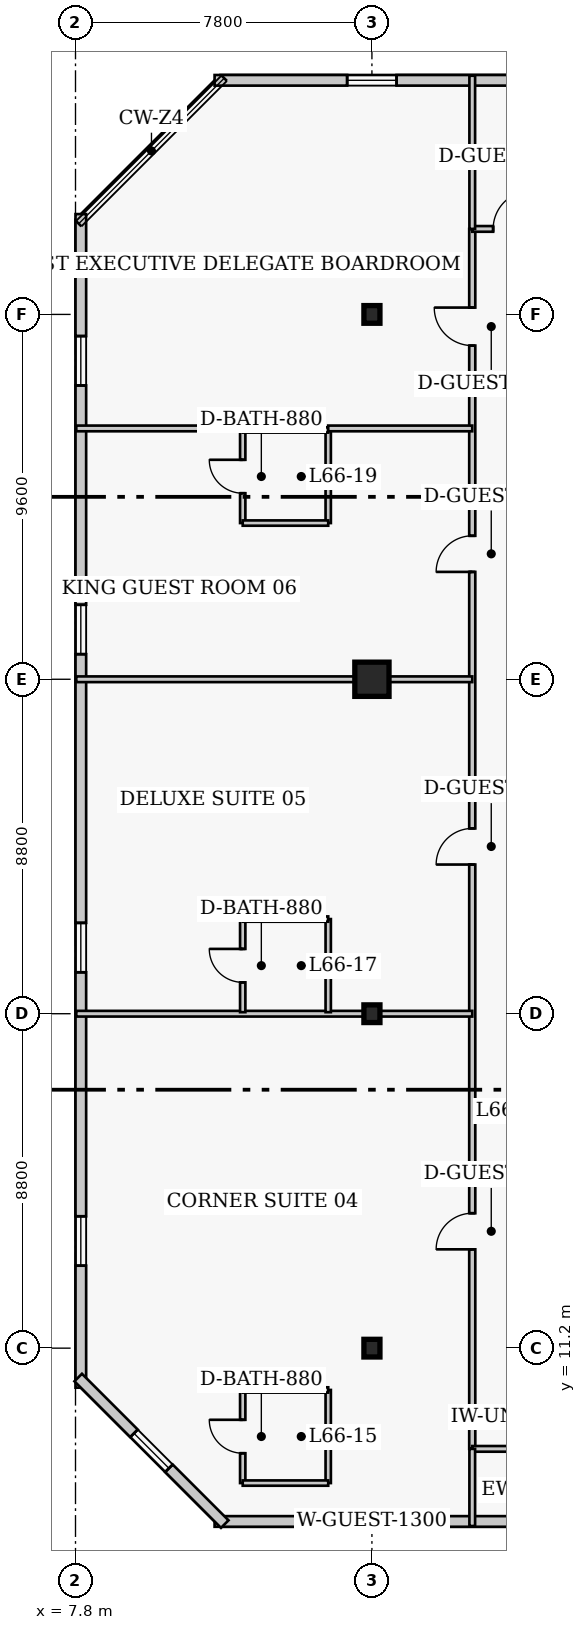
"""IFC4 building model, lengths in metres.
Left out: names, types, materials, properties, quantities, classifications, styles, units other than length and angle.
Written with IfcOpenShell. Run it as: python <this file> out.ifc"""

import sys

from ifc_helpers import new_model, si_unit, direction, frame, frame_2d, origin, origin_2d, place, context, subcontext, project, spatial, rectangle, i_section, extrude, element, fill, save


model = new_model("IFC4")
c1 = context("Model", 3, precision=1e-05, world=origin(), true_north=direction((0.0, 1.0)))
c2 = subcontext(c1, "Body", "Model", "MODEL_VIEW")
j1 = project(units=[si_unit("LENGTHUNIT", "METRE"), si_unit("PLANEANGLEUNIT", "RADIAN")], contexts=[c1])
p1 = place(None, origin())
s1 = spatial("IfcSite", under=j1, at=p1, CompositionType="ELEMENT")
p2 = place(p1, origin())
s2 = spatial("IfcBuilding", under=s1, at=p2, CompositionType="ELEMENT")
p3 = place(p2, frame((0.0, 0.0, 265.4)))
s3 = spatial("IfcBuildingStorey", under=s2, at=p3, CompositionType="ELEMENT", Elevation=265.4)
for number, where, z_axis, x_axis in (
    (1, (15.6, 11.2, 0.0), (0.0, 0.0, 1.0), (1.0, 0.0, 0.0)),
    (2, (15.6, 20.0, 0.0), (0.0, 0.0, 1.0), (1.0, 0.0, 0.0)),
):
    element("IfcColumn", number, at=place(p3, frame(where, z_axis=z_axis, x_axis=x_axis)), inside=s3, PredefinedType="COLUMN", context=c2, shape_type="SweptSolid", body=[
        extrude(i_section(OverallWidth=0.422, OverallDepth=0.465, WebThickness=0.045, FlangeThickness=0.073, FilletRadius=0.017, at=origin_2d()), origin(), (0.0, 0.0, 1.0), 4.0),
    ])
p4 = place(p3, frame((15.6, 28.8, 0.0), z_axis=(0.0, 0.0, 1.0), x_axis=(1.0, 0.0, 0.0)))
e3 = element("IfcColumn", 3, at=p4, inside=s3, PredefinedType="COLUMN", context=c2, shape_type="SweptSolid", body=[
    extrude(rectangle(XDim=0.9, YDim=0.9, at=origin_2d()), origin(), (0.0, 0.0, 1.0), 4.0),
])
p5 = place(p3, frame((15.6, 38.4, 0.0), z_axis=(0.0, 0.0, 1.0), x_axis=(1.0, 0.0, 0.0)))
e4 = element("IfcColumn", 4, at=p5, inside=s3, PredefinedType="COLUMN", context=c2, shape_type="SweptSolid", body=[
    extrude(i_section(OverallWidth=0.422, OverallDepth=0.465, WebThickness=0.045, FlangeThickness=0.073, FilletRadius=0.017, at=origin_2d()), origin(), (0.0, 0.0, 1.0), 4.0),
])
p6 = place(p3, frame((11.46, 6.64, 0.0), z_axis=(0.0, 0.0, 1.0), x_axis=(1.0, 0.0, 0.0)))
e5 = element("IfcWall", 5, at=p6, inside=s3, PredefinedType="SOLIDWALL", context=c2, shape_type="SweptSolid", body=[
    extrude(rectangle(XDim=24.83, YDim=0.28, at=frame_2d((12.415, 0.0))), origin(), (0.0, 0.0, 1.0), 3.76),
])
p7 = place(p6, frame((3.488, 0.0, 0.85)))
e6 = element("IfcOpeningElement", 6, at=p7, cuts=e5, PredefinedType="OPENING", context=c2, shape_type="SweptSolid", body=[
    extrude(rectangle(XDim=1.3, YDim=1.7, at=frame_2d((0.65, 0.85))), frame((0.0, 0.15, 0.0), z_axis=(0.0, -1.0, 0.0), x_axis=(1.0, 0.0, 0.0)), (0.0, 0.0, 1.0), 0.3),
])
p8 = place(p6, frame((12.915, 0.0, 0.85)))
e7 = element("IfcOpeningElement", 7, at=p8, cuts=e5, PredefinedType="OPENING", context=c2, shape_type="SweptSolid", body=[
    extrude(rectangle(XDim=1.3, YDim=1.7, at=frame_2d((0.65, 0.85))), frame((0.0, 0.15, 0.0), z_axis=(0.0, -1.0, 0.0), x_axis=(1.0, 0.0, 0.0)), (0.0, 0.0, 1.0), 0.3),
])
p9 = place(p6, frame((20.692, 0.0, 0.85)))
e8 = element("IfcOpeningElement", 8, at=p9, cuts=e5, PredefinedType="OPENING", context=c2, shape_type="SweptSolid", body=[
    extrude(rectangle(XDim=1.3, YDim=1.7, at=frame_2d((0.65, 0.85))), frame((0.0, 0.15, 0.0), z_axis=(0.0, -1.0, 0.0), x_axis=(1.0, 0.0, 0.0)), (0.0, 0.0, 1.0), 0.3),
])
p10 = place(p3, frame((36.29, 44.56, 0.0), z_axis=(0.0, 0.0, 1.0), x_axis=(-1.0, 0.0, 0.0)))
e9 = element("IfcWall", 9, at=p10, inside=s3, PredefinedType="SOLIDWALL", context=c2, shape_type="SweptSolid", body=[
    extrude(rectangle(XDim=24.83, YDim=0.28, at=frame_2d((12.415, 0.0))), origin(), (0.0, 0.0, 1.0), 3.76),
])
p11 = place(p10, frame((3.488, 0.0, 0.85)))
e10 = element("IfcOpeningElement", 10, at=p11, cuts=e9, PredefinedType="OPENING", context=c2, shape_type="SweptSolid", body=[
    extrude(rectangle(XDim=1.3, YDim=1.7, at=frame_2d((0.65, 0.85))), frame((0.0, 0.15, 0.0), z_axis=(0.0, -1.0, 0.0), x_axis=(1.0, 0.0, 0.0)), (0.0, 0.0, 1.0), 0.3),
])
p12 = place(p10, frame((11.765, 0.0, 0.85)))
e11 = element("IfcOpeningElement", 11, at=p12, cuts=e9, PredefinedType="OPENING", context=c2, shape_type="SweptSolid", body=[
    extrude(rectangle(XDim=1.3, YDim=1.7, at=frame_2d((0.65, 0.85))), frame((0.0, 0.15, 0.0), z_axis=(0.0, -1.0, 0.0), x_axis=(1.0, 0.0, 0.0)), (0.0, 0.0, 1.0), 0.3),
])
p13 = place(p10, frame((20.042, 0.0, 0.85)))
e12 = element("IfcOpeningElement", 12, at=p13, cuts=e9, PredefinedType="OPENING", context=c2, shape_type="SweptSolid", body=[
    extrude(rectangle(XDim=1.3, YDim=1.7, at=frame_2d((0.65, 0.85))), frame((0.0, 0.15, 0.0), z_axis=(0.0, -1.0, 0.0), x_axis=(1.0, 0.0, 0.0)), (0.0, 0.0, 1.0), 0.3),
])
p14 = place(p3, frame((7.94, 41.04, 0.0), z_axis=(0.0, 0.0, 1.0), x_axis=(0.0, -1.0, 0.0)))
e13 = element("IfcWall", 13, at=p14, inside=s3, PredefinedType="SOLIDWALL", context=c2, shape_type="SweptSolid", body=[
    extrude(rectangle(XDim=30.88, YDim=0.28, at=frame_2d((15.44, 0.0))), origin(), (0.0, 0.0, 1.0), 3.76),
])
p15 = place(p14, frame((3.21, 0.0, 0.85)))
e14 = element("IfcOpeningElement", 14, at=p15, cuts=e13, PredefinedType="OPENING", context=c2, shape_type="SweptSolid", body=[
    extrude(rectangle(XDim=1.3, YDim=1.7, at=frame_2d((0.65, 0.85))), frame((0.0, 0.15, 0.0), z_axis=(0.0, -1.0, 0.0), x_axis=(1.0, 0.0, 0.0)), (0.0, 0.0, 1.0), 0.3),
])
p16 = place(p14, frame((10.28, 0.0, 0.85)))
e15 = element("IfcOpeningElement", 15, at=p16, cuts=e13, PredefinedType="OPENING", context=c2, shape_type="SweptSolid", body=[
    extrude(rectangle(XDim=1.3, YDim=1.7, at=frame_2d((0.65, 0.85))), frame((0.0, 0.15, 0.0), z_axis=(0.0, -1.0, 0.0), x_axis=(1.0, 0.0, 0.0)), (0.0, 0.0, 1.0), 0.3),
])
p17 = place(p14, frame((18.65, 0.0, 0.85)))
e16 = element("IfcOpeningElement", 16, at=p17, cuts=e13, PredefinedType="OPENING", context=c2, shape_type="SweptSolid", body=[
    extrude(rectangle(XDim=1.3, YDim=1.7, at=frame_2d((0.65, 0.85))), frame((0.0, 0.15, 0.0), z_axis=(0.0, -1.0, 0.0), x_axis=(1.0, 0.0, 0.0)), (0.0, 0.0, 1.0), 0.3),
])
p18 = place(p14, frame((26.37, 0.0, 0.85)))
e17 = element("IfcOpeningElement", 17, at=p18, cuts=e13, PredefinedType="OPENING", context=c2, shape_type="SweptSolid", body=[
    extrude(rectangle(XDim=1.3, YDim=1.7, at=frame_2d((0.65, 0.85))), frame((0.0, 0.15, 0.0), z_axis=(0.0, -1.0, 0.0), x_axis=(1.0, 0.0, 0.0)), (0.0, 0.0, 1.0), 0.3),
])
p19 = place(p3, frame((7.871, 10.427, 0.0), z_axis=(0.0, 0.0, 1.0), x_axis=(0.707129162587, -0.707084399077, 0.0)))
e18 = element("IfcWall", 18, at=p19, inside=s3, PredefinedType="SOLIDWALL", context=c2, shape_type="SweptSolid", body=[
    extrude(rectangle(XDim=5.454, YDim=0.28, at=frame_2d((2.727, 0.0))), origin(), (0.0, 0.0, 1.0), 3.76),
])
p20 = place(p19, frame((2.077, 0.0, 0.85)))
e19 = element("IfcOpeningElement", 19, at=p20, cuts=e18, PredefinedType="OPENING", context=c2, shape_type="SweptSolid", body=[
    extrude(rectangle(XDim=1.3, YDim=1.7, at=frame_2d((0.65, 0.85))), frame((0.0, 0.15, 0.0), z_axis=(0.0, -1.0, 0.0), x_axis=(1.0, 0.0, 0.0)), (0.0, 0.0, 1.0), 0.3),
])
p21 = place(p3, frame((18.24, 8.55, 0.0), z_axis=(0.0, 0.0, 1.0), x_axis=(0.0, 1.0, 0.0)))
e20 = element("IfcWall", 20, at=p21, inside=s3, PredefinedType="PARTITIONING", context=c2, shape_type="SweptSolid", body=[
    extrude(rectangle(XDim=32.1, YDim=0.16, at=frame_2d((16.05, 0.0))), origin(), (0.0, 0.0, 1.0), 3.76),
])
p22 = place(p21, frame((5.25, 0.0, 0.0)))
e21 = element("IfcOpeningElement", 21, at=p22, cuts=e20, PredefinedType="OPENING", context=c2, shape_type="SweptSolid", body=[
    extrude(rectangle(XDim=0.95, YDim=2.1, at=frame_2d((0.475, 1.05))), frame((0.0, 0.09, 0.0), z_axis=(0.0, -1.0, 0.0), x_axis=(1.0, 0.0, 0.0)), (0.0, 0.0, 1.0), 0.18),
])
p23 = place(p21, frame((15.375, 0.0, 0.0)))
e22 = element("IfcOpeningElement", 22, at=p23, cuts=e20, PredefinedType="OPENING", context=c2, shape_type="SweptSolid", body=[
    extrude(rectangle(XDim=0.95, YDim=2.1, at=frame_2d((0.475, 1.05))), frame((0.0, 0.09, 0.0), z_axis=(0.0, -1.0, 0.0), x_axis=(1.0, 0.0, 0.0)), (0.0, 0.0, 1.0), 0.18),
])
p24 = place(p21, frame((23.075, 0.0, 0.0)))
e23 = element("IfcOpeningElement", 23, at=p24, cuts=e20, PredefinedType="OPENING", context=c2, shape_type="SweptSolid", body=[
    extrude(rectangle(XDim=0.95, YDim=2.1, at=frame_2d((0.475, 1.05))), frame((0.0, 0.09, 0.0), z_axis=(0.0, -1.0, 0.0), x_axis=(1.0, 0.0, 0.0)), (0.0, 0.0, 1.0), 0.18),
])
p25 = place(p21, frame((29.03, 0.0, 0.0)))
e24 = element("IfcOpeningElement", 24, at=p25, cuts=e20, PredefinedType="OPENING", context=c2, shape_type="SweptSolid", body=[
    extrude(rectangle(XDim=1.0, YDim=2.15, at=frame_2d((0.5, 1.075))), frame((0.0, 0.09, 0.0), z_axis=(0.0, -1.0, 0.0), x_axis=(1.0, 0.0, 0.0)), (0.0, 0.0, 1.0), 0.18),
])
p26 = place(p3, frame((18.24, 8.55, 0.0), z_axis=(0.0, 0.0, 1.0), x_axis=(1.0, 0.0, 0.0)))
e25 = element("IfcWall", 25, at=p26, inside=s3, PredefinedType="PARTITIONING", context=c2, shape_type="SweptSolid", body=[
    extrude(rectangle(XDim=2.22, YDim=0.15, at=frame_2d((1.11, 0.0))), origin(), (0.0, 0.0, 1.0), 3.76),
])
p27 = place(p3, frame((18.24, 40.65, 0.0), z_axis=(0.0, 0.0, 1.0), x_axis=(1.0, 0.0, 0.0)))
e26 = element("IfcWall", 26, at=p27, inside=s3, PredefinedType="PARTITIONING", context=c2, shape_type="SweptSolid", body=[
    extrude(rectangle(XDim=3.86, YDim=0.15, at=frame_2d((1.93, 0.0))), origin(), (0.0, 0.0, 1.0), 3.76),
])
p28 = place(p27, frame((0.55, 0.0, 0.0)))
e27 = element("IfcOpeningElement", 27, at=p28, cuts=e26, PredefinedType="OPENING", context=c2, shape_type="SweptSolid", body=[
    extrude(rectangle(XDim=1.0, YDim=2.15, at=frame_2d((0.5, 1.075))), frame((0.0, 0.085, 0.0), z_axis=(0.0, -1.0, 0.0), x_axis=(1.0, 0.0, 0.0)), (0.0, 0.0, 1.0), 0.17),
])
p29 = place(p3, frame((18.24, 40.65, 0.0), z_axis=(0.0, 0.0, 1.0), x_axis=(0.0, 1.0, 0.0)))
e28 = element("IfcWall", 28, at=p29, inside=s3, PredefinedType="PARTITIONING", context=c2, shape_type="SweptSolid", body=[
    extrude(rectangle(XDim=4.03, YDim=0.15, at=frame_2d((2.015, 0.0))), origin(), (0.0, 0.0, 1.0), 3.76),
])
p30 = place(p3, frame((18.24, 6.52, 0.0), z_axis=(0.0, 0.0, 1.0), x_axis=(0.0, 1.0, 0.0)))
e29 = element("IfcWall", 29, at=p30, inside=s3, PredefinedType="PARTITIONING", context=c2, shape_type="SweptSolid", body=[
    extrude(rectangle(XDim=2.03, YDim=0.15, at=frame_2d((1.015, 0.0))), origin(), (0.0, 0.0, 1.0), 3.76),
])
p31 = place(p3, frame((12.2, 7.65, 0.0), z_axis=(0.0, 0.0, 1.0), x_axis=(0.0, 1.0, 0.0)))
e30 = element("IfcWall", 30, at=p31, inside=s3, PredefinedType="PLUMBINGWALL", context=c2, shape_type="SweptSolid", body=[
    extrude(rectangle(XDim=2.45, YDim=0.14, at=frame_2d((1.225, 0.0))), origin(), (0.0, 0.0, 1.0), 3.76),
])
p32 = place(p31, frame((0.785, 0.0, 0.0)))
e31 = element("IfcOpeningElement", 31, at=p32, cuts=e30, PredefinedType="OPENING", context=c2, shape_type="SweptSolid", body=[
    extrude(rectangle(XDim=0.88, YDim=2.05, at=frame_2d((0.44, 1.025))), frame((0.0, 0.08, 0.0), z_axis=(0.0, -1.0, 0.0), x_axis=(1.0, 0.0, 0.0)), (0.0, 0.0, 1.0), 0.16),
])
p33 = place(p3, frame((14.45, 7.65, 0.0), z_axis=(0.0, 0.0, 1.0), x_axis=(0.0, 1.0, 0.0)))
e32 = element("IfcWall", 32, at=p33, inside=s3, PredefinedType="PLUMBINGWALL", context=c2, shape_type="SweptSolid", body=[
    extrude(rectangle(XDim=2.45, YDim=0.14, at=frame_2d((1.225, 0.0))), origin(), (0.0, 0.0, 1.0), 3.76),
])
for number, where, z_axis, x_axis in (
    (33, (12.2, 7.65, 0.0), (0.0, 0.0, 1.0), (1.0, 0.0, 0.0)),
    (34, (12.2, 10.1, 0.0), (0.0, 0.0, 1.0), (1.0, 0.0, 0.0)),
):
    element("IfcWall", number, at=place(p3, frame(where, z_axis=z_axis, x_axis=x_axis)), inside=s3, PredefinedType="PLUMBINGWALL", context=c2, shape_type="SweptSolid", body=[
        extrude(rectangle(XDim=2.25, YDim=0.14, at=frame_2d((1.125, 0.0))), origin(), (0.0, 0.0, 1.0), 3.76),
    ])
p34 = place(p3, frame((7.82, 20.0, 0.0), z_axis=(0.0, 0.0, 1.0), x_axis=(1.0, 0.0, 0.0)))
e35 = element("IfcWall", 35, at=p34, inside=s3, PredefinedType="PARTITIONING", context=c2, shape_type="SweptSolid", body=[
    extrude(rectangle(XDim=10.42, YDim=0.15, at=frame_2d((5.21, 0.0))), origin(), (0.0, 0.0, 1.0), 3.064),
])
p35 = place(p3, frame((12.2, 20.04, 0.0), z_axis=(0.0, 0.0, 1.0), x_axis=(0.0, 1.0, 0.0)))
e36 = element("IfcWall", 36, at=p35, inside=s3, PredefinedType="PLUMBINGWALL", context=c2, shape_type="SweptSolid", body=[
    extrude(rectangle(XDim=2.45, YDim=0.14, at=frame_2d((1.225, 0.0))), origin(), (0.0, 0.0, 1.0), 3.76),
])
p36 = place(p35, frame((0.785, 0.0, 0.0)))
e37 = element("IfcOpeningElement", 37, at=p36, cuts=e36, PredefinedType="OPENING", context=c2, shape_type="SweptSolid", body=[
    extrude(rectangle(XDim=0.88, YDim=2.05, at=frame_2d((0.44, 1.025))), frame((0.0, 0.08, 0.0), z_axis=(0.0, -1.0, 0.0), x_axis=(1.0, 0.0, 0.0)), (0.0, 0.0, 1.0), 0.16),
])
p37 = place(p3, frame((14.45, 20.04, 0.0), z_axis=(0.0, 0.0, 1.0), x_axis=(0.0, 1.0, 0.0)))
e38 = element("IfcWall", 38, at=p37, inside=s3, PredefinedType="PLUMBINGWALL", context=c2, shape_type="SweptSolid", body=[
    extrude(rectangle(XDim=2.45, YDim=0.14, at=frame_2d((1.225, 0.0))), origin(), (0.0, 0.0, 1.0), 3.76),
])
p38 = place(p3, frame((12.2, 22.49, 0.0), z_axis=(0.0, 0.0, 1.0), x_axis=(1.0, 0.0, 0.0)))
e39 = element("IfcWall", 39, at=p38, inside=s3, PredefinedType="PLUMBINGWALL", context=c2, shape_type="SweptSolid", body=[
    extrude(rectangle(XDim=2.25, YDim=0.14, at=frame_2d((1.125, 0.0))), origin(), (0.0, 0.0, 1.0), 3.76),
])
p39 = place(p3, frame((7.82, 28.8, 0.0), z_axis=(0.0, 0.0, 1.0), x_axis=(1.0, 0.0, 0.0)))
e40 = element("IfcWall", 40, at=p39, inside=s3, PredefinedType="PARTITIONING", context=c2, shape_type="SweptSolid", body=[
    extrude(rectangle(XDim=10.42, YDim=0.15, at=frame_2d((5.21, 0.0))), origin(), (0.0, 0.0, 1.0), 3.064),
])
p40 = place(p3, frame((12.2, 32.91, 0.0), z_axis=(0.0, 0.0, 1.0), x_axis=(0.0, 1.0, 0.0)))
e41 = element("IfcWall", 41, at=p40, inside=s3, PredefinedType="PLUMBINGWALL", context=c2, shape_type="SweptSolid", body=[
    extrude(rectangle(XDim=2.45, YDim=0.14, at=frame_2d((1.225, 0.0))), origin(), (0.0, 0.0, 1.0), 3.76),
])
p41 = place(p40, frame((0.785, 0.0, 0.0)))
e42 = element("IfcOpeningElement", 42, at=p41, cuts=e41, PredefinedType="OPENING", context=c2, shape_type="SweptSolid", body=[
    extrude(rectangle(XDim=0.88, YDim=2.05, at=frame_2d((0.44, 1.025))), frame((0.0, 0.08, 0.0), z_axis=(0.0, -1.0, 0.0), x_axis=(1.0, 0.0, 0.0)), (0.0, 0.0, 1.0), 0.16),
])
p42 = place(p3, frame((14.45, 32.91, 0.0), z_axis=(0.0, 0.0, 1.0), x_axis=(0.0, 1.0, 0.0)))
e43 = element("IfcWall", 43, at=p42, inside=s3, PredefinedType="PLUMBINGWALL", context=c2, shape_type="SweptSolid", body=[
    extrude(rectangle(XDim=2.45, YDim=0.14, at=frame_2d((1.225, 0.0))), origin(), (0.0, 0.0, 1.0), 3.76),
])
for number, where, z_axis, x_axis in (
    (44, (12.2, 32.91, 0.0), (0.0, 0.0, 1.0), (1.0, 0.0, 0.0)),
    (45, (12.2, 35.36, 0.0), (0.0, 0.0, 1.0), (1.0, 0.0, 0.0)),
):
    element("IfcWall", number, at=place(p3, frame(where, z_axis=z_axis, x_axis=x_axis)), inside=s3, PredefinedType="PLUMBINGWALL", context=c2, shape_type="SweptSolid", body=[
        extrude(rectangle(XDim=2.25, YDim=0.14, at=frame_2d((1.125, 0.0))), origin(), (0.0, 0.0, 1.0), 3.76),
    ])
p43 = place(p3, frame((7.82, 35.4, 0.0), z_axis=(0.0, 0.0, 1.0), x_axis=(1.0, 0.0, 0.0)))
e46 = element("IfcWall", 46, at=p43, inside=s3, PredefinedType="PARTITIONING", context=c2, shape_type="SweptSolid", body=[
    extrude(rectangle(XDim=4.38, YDim=0.15, at=frame_2d((2.19, 0.0))), origin(), (0.0, 0.0, 1.0), 3.76),
])
p44 = place(p3, frame((14.45, 35.4, 0.0), z_axis=(0.0, 0.0, 1.0), x_axis=(1.0, 0.0, 0.0)))
e47 = element("IfcWall", 47, at=p44, inside=s3, PredefinedType="PARTITIONING", context=c2, shape_type="SweptSolid", body=[
    extrude(rectangle(XDim=3.79, YDim=0.15, at=frame_2d((1.895, 0.0))), origin(), (0.0, 0.0, 1.0), 3.76),
])
p45 = place(p7, origin())
e48 = element("IfcWindow", 48, at=p45, inside=s3, PartitioningType="SINGLE_PANEL", PredefinedType="WINDOW", context=c2, shape_type="SweptSolid", body=[
    extrude(rectangle(XDim=1.3, YDim=1.7, at=frame_2d((0.65, 0.85))), frame((0.0, 0.03, 0.0), z_axis=(0.0, -1.0, 0.0), x_axis=(1.0, 0.0, 0.0)), (0.0, 0.0, 1.0), 0.06),
])
fill(e6, e48)
p46 = place(p13, origin())
e49 = element("IfcWindow", 49, at=p46, inside=s3, PartitioningType="SINGLE_PANEL", PredefinedType="WINDOW", context=c2, shape_type="SweptSolid", body=[
    extrude(rectangle(XDim=1.3, YDim=1.7, at=frame_2d((0.65, 0.85))), frame((0.0, 0.03, 0.0), z_axis=(0.0, -1.0, 0.0), x_axis=(1.0, 0.0, 0.0)), (0.0, 0.0, 1.0), 0.06),
])
fill(e12, e49)
p47 = place(p15, origin())
e50 = element("IfcWindow", 50, at=p47, inside=s3, PartitioningType="SINGLE_PANEL", PredefinedType="WINDOW", context=c2, shape_type="SweptSolid", body=[
    extrude(rectangle(XDim=1.3, YDim=1.7, at=frame_2d((0.65, 0.85))), frame((0.0, 0.03, 0.0), z_axis=(0.0, -1.0, 0.0), x_axis=(1.0, 0.0, 0.0)), (0.0, 0.0, 1.0), 0.06),
])
fill(e14, e50)
p48 = place(p16, origin())
e51 = element("IfcWindow", 51, at=p48, inside=s3, PartitioningType="SINGLE_PANEL", PredefinedType="WINDOW", context=c2, shape_type="SweptSolid", body=[
    extrude(rectangle(XDim=1.3, YDim=1.7, at=frame_2d((0.65, 0.85))), frame((0.0, 0.03, 0.0), z_axis=(0.0, -1.0, 0.0), x_axis=(1.0, 0.0, 0.0)), (0.0, 0.0, 1.0), 0.06),
])
fill(e15, e51)
p49 = place(p17, origin())
e52 = element("IfcWindow", 52, at=p49, inside=s3, PartitioningType="SINGLE_PANEL", PredefinedType="WINDOW", context=c2, shape_type="SweptSolid", body=[
    extrude(rectangle(XDim=1.3, YDim=1.7, at=frame_2d((0.65, 0.85))), frame((0.0, 0.03, 0.0), z_axis=(0.0, -1.0, 0.0), x_axis=(1.0, 0.0, 0.0)), (0.0, 0.0, 1.0), 0.06),
])
fill(e16, e52)
p50 = place(p18, origin())
e53 = element("IfcWindow", 53, at=p50, inside=s3, PartitioningType="SINGLE_PANEL", PredefinedType="WINDOW", context=c2, shape_type="SweptSolid", body=[
    extrude(rectangle(XDim=1.3, YDim=1.7, at=frame_2d((0.65, 0.85))), frame((0.0, 0.03, 0.0), z_axis=(0.0, -1.0, 0.0), x_axis=(1.0, 0.0, 0.0)), (0.0, 0.0, 1.0), 0.06),
])
fill(e17, e53)
p51 = place(p20, origin())
e54 = element("IfcWindow", 54, at=p51, inside=s3, PartitioningType="SINGLE_PANEL", PredefinedType="WINDOW", context=c2, shape_type="SweptSolid", body=[
    extrude(rectangle(XDim=1.3, YDim=1.7, at=frame_2d((0.65, 0.85))), frame((0.0, 0.03, 0.0), z_axis=(0.0, -1.0, 0.0), x_axis=(1.0, 0.0, 0.0)), (0.0, 0.0, 1.0), 0.06),
])
fill(e19, e54)
p52 = place(p28, origin())
e55 = element("IfcDoor", 55, at=p52, inside=s3, OperationType="SINGLE_SWING_RIGHT", PredefinedType="DOOR", context=c2, shape_type="SweptSolid", body=[
    extrude(rectangle(XDim=1.0, YDim=2.15, at=frame_2d((0.5, 1.075))), frame((0.0, 0.025, 0.0), z_axis=(0.0, -1.0, 0.0), x_axis=(1.0, 0.0, 0.0)), (0.0, 0.0, 1.0), 0.05),
])
fill(e27, e55)
p53 = place(p32, origin())
e56 = element("IfcDoor", 56, at=p53, inside=s3, OperationType="SINGLE_SWING_RIGHT", PredefinedType="DOOR", context=c2, shape_type="SweptSolid", body=[
    extrude(rectangle(XDim=0.88, YDim=2.05, at=frame_2d((0.44, 1.025))), frame((0.0, 0.025, 0.0), z_axis=(0.0, -1.0, 0.0), x_axis=(1.0, 0.0, 0.0)), (0.0, 0.0, 1.0), 0.05),
])
fill(e31, e56)
p54 = place(p22, origin())
e57 = element("IfcDoor", 57, at=p54, inside=s3, OperationType="SINGLE_SWING_LEFT", PredefinedType="DOOR", context=c2, shape_type="SweptSolid", body=[
    extrude(rectangle(XDim=0.95, YDim=2.1, at=frame_2d((0.475, 1.05))), frame((0.0, 0.025, 0.0), z_axis=(0.0, -1.0, 0.0), x_axis=(1.0, 0.0, 0.0)), (0.0, 0.0, 1.0), 0.05),
])
fill(e21, e57)
p55 = place(p36, origin())
e58 = element("IfcDoor", 58, at=p55, inside=s3, OperationType="SINGLE_SWING_RIGHT", PredefinedType="DOOR", context=c2, shape_type="SweptSolid", body=[
    extrude(rectangle(XDim=0.88, YDim=2.05, at=frame_2d((0.44, 1.025))), frame((0.0, 0.025, 0.0), z_axis=(0.0, -1.0, 0.0), x_axis=(1.0, 0.0, 0.0)), (0.0, 0.0, 1.0), 0.05),
])
fill(e37, e58)
p56 = place(p23, origin())
e59 = element("IfcDoor", 59, at=p56, inside=s3, OperationType="SINGLE_SWING_LEFT", PredefinedType="DOOR", context=c2, shape_type="SweptSolid", body=[
    extrude(rectangle(XDim=0.95, YDim=2.1, at=frame_2d((0.475, 1.05))), frame((0.0, 0.025, 0.0), z_axis=(0.0, -1.0, 0.0), x_axis=(1.0, 0.0, 0.0)), (0.0, 0.0, 1.0), 0.05),
])
fill(e22, e59)
p57 = place(p41, origin())
e60 = element("IfcDoor", 60, at=p57, inside=s3, OperationType="SINGLE_SWING_RIGHT", PredefinedType="DOOR", context=c2, shape_type="SweptSolid", body=[
    extrude(rectangle(XDim=0.88, YDim=2.05, at=frame_2d((0.44, 1.025))), frame((0.0, 0.025, 0.0), z_axis=(0.0, -1.0, 0.0), x_axis=(1.0, 0.0, 0.0)), (0.0, 0.0, 1.0), 0.05),
])
fill(e42, e60)
p58 = place(p24, origin())
e61 = element("IfcDoor", 61, at=p58, inside=s3, OperationType="SINGLE_SWING_LEFT", PredefinedType="DOOR", context=c2, shape_type="SweptSolid", body=[
    extrude(rectangle(XDim=0.95, YDim=2.1, at=frame_2d((0.475, 1.05))), frame((0.0, 0.025, 0.0), z_axis=(0.0, -1.0, 0.0), x_axis=(1.0, 0.0, 0.0)), (0.0, 0.0, 1.0), 0.05),
])
fill(e23, e61)
p59 = place(p25, origin())
e62 = element("IfcDoor", 62, at=p59, inside=s3, OperationType="SINGLE_SWING_RIGHT", PredefinedType="DOOR", context=c2, shape_type="SweptSolid", body=[
    extrude(rectangle(XDim=1.0, YDim=2.15, at=frame_2d((0.5, 1.075))), frame((0.0, 0.025, 0.0), z_axis=(0.0, -1.0, 0.0), x_axis=(1.0, 0.0, 0.0)), (0.0, 0.0, 1.0), 0.05),
])
fill(e24, e62)
save(model, sys.argv[1])
